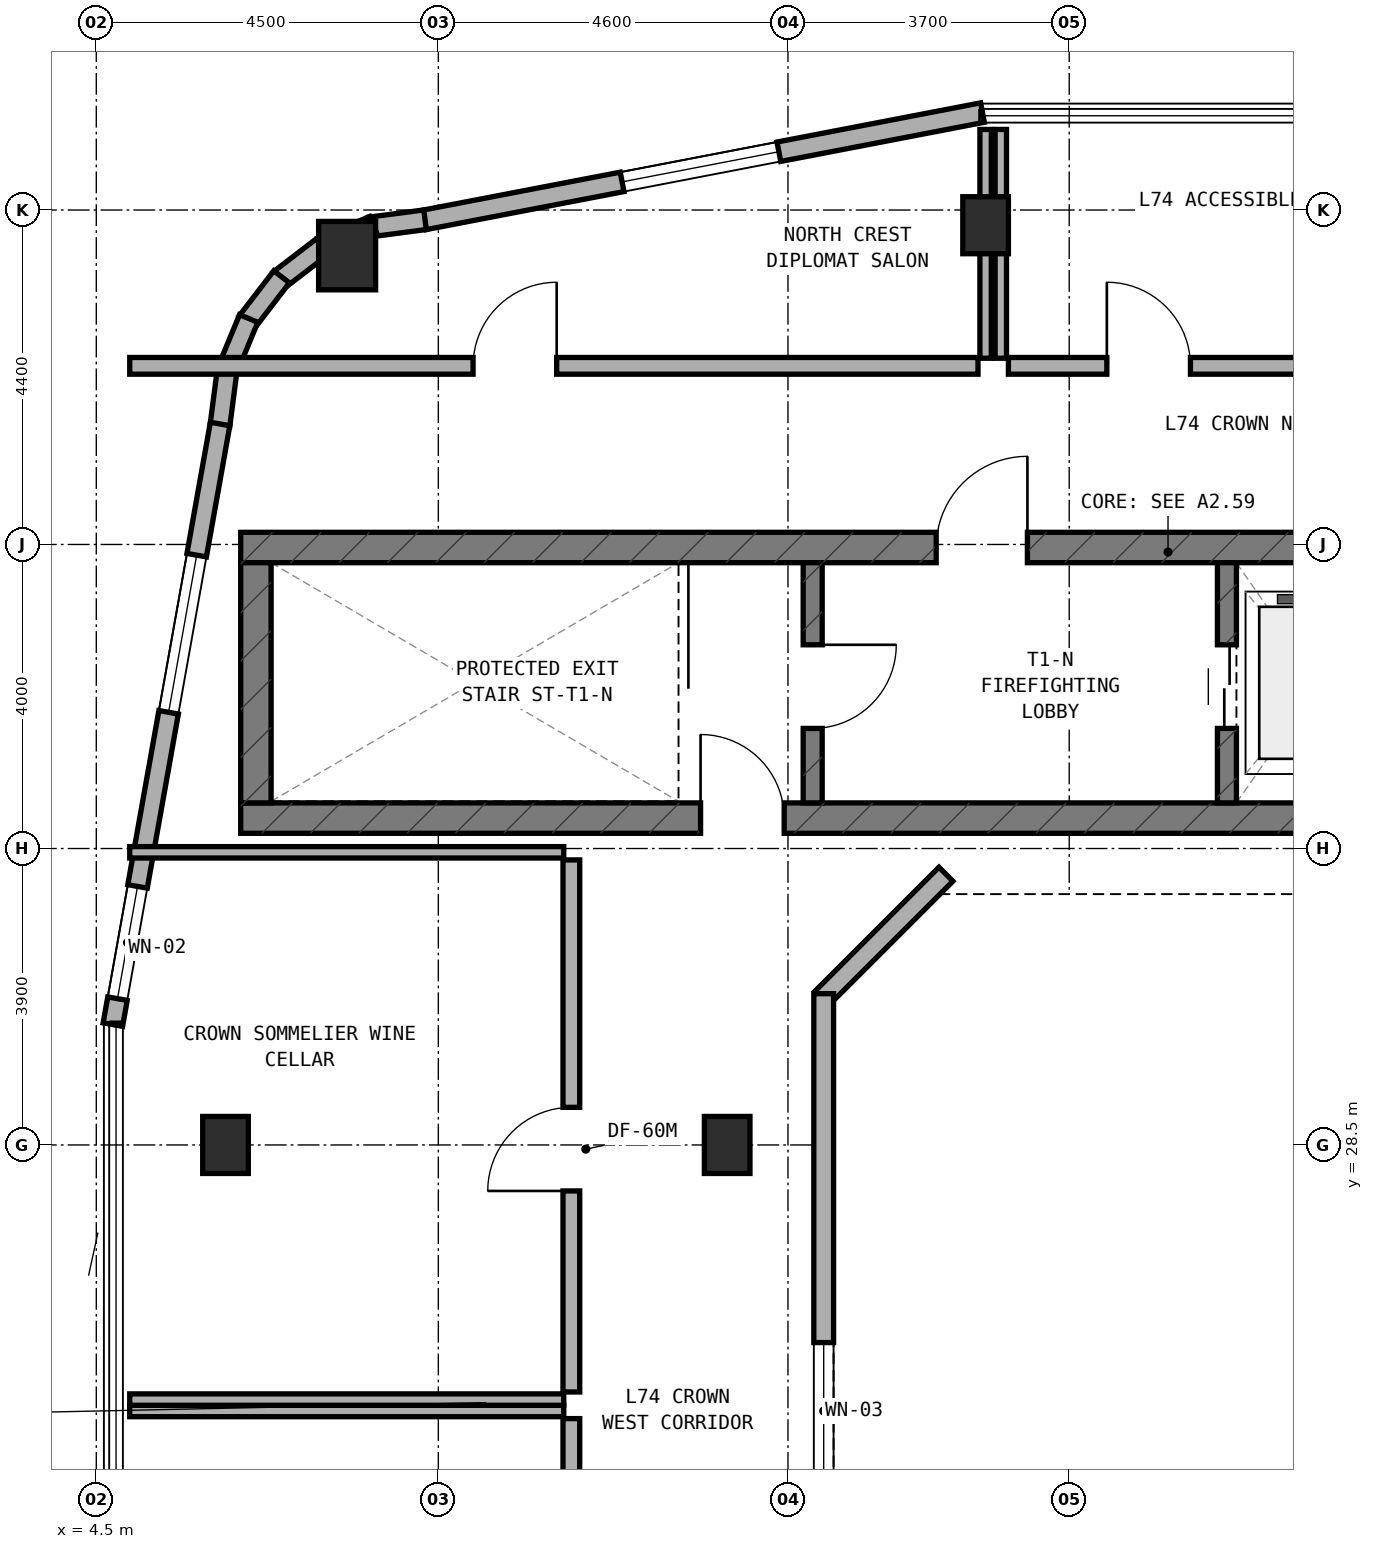
"""IFC4 building model, lengths in metres.
Left out: names, types, materials, properties, quantities, classifications, styles, units other than length and angle.
Written with IfcOpenShell. Run it as: python <this file> out.ifc"""

import sys

from ifc_helpers import new_model, si_unit, direction, frame, frame_2d, origin, origin_2d, place, context, subcontext, project, spatial, rectangle, extrude, element, fill, save


model = new_model("IFC4")
c1 = context("Model", 3, precision=1e-05, world=origin(), true_north=direction((0.0, 1.0)))
c2 = subcontext(c1, "Body", "Model", "MODEL_VIEW")
j1 = project(units=[si_unit("LENGTHUNIT", "METRE"), si_unit("PLANEANGLEUNIT", "RADIAN")], contexts=[c1])
p1 = place(None, origin())
s1 = spatial("IfcSite", under=j1, at=p1, CompositionType="ELEMENT")
p2 = place(p1, origin())
s2 = spatial("IfcBuilding", under=s1, at=p2, CompositionType="ELEMENT")
p3 = place(p2, frame((0.0, 0.0, 272.0)))
s3 = spatial("IfcBuildingStorey", under=s2, at=p3, CompositionType="ELEMENT", Elevation=272.0)
p4 = place(p3, frame((6.4, 32.8, 0.0), z_axis=(0.0, 0.0, 1.0), x_axis=(1.0, 0.0, 0.0)))
e1 = element("IfcWall", 1, at=p4, inside=s3, PredefinedType="SHEAR", context=c2, shape_type="SweptSolid", body=[
    extrude(rectangle(XDim=24.4, YDim=0.4, at=frame_2d((12.2, 0.0))), origin(), (0.0, 0.0, 1.0), 4.56),
])
p5 = place(p4, frame((6.05, 0.0, 0.0)))
e2 = element("IfcOpeningElement", 2, at=p5, cuts=e1, PredefinedType="OPENING", context=c2, shape_type="SweptSolid", body=[
    extrude(rectangle(XDim=1.1, YDim=2.15, at=frame_2d((0.55, 1.075))), frame((0.0, 0.21, 0.0), z_axis=(0.0, -1.0, 0.0), x_axis=(1.0, 0.0, 0.0)), (0.0, 0.0, 1.0), 0.42),
])
p6 = place(p3, frame((6.4, 36.36, 0.0), z_axis=(0.0, 0.0, 1.0), x_axis=(1.0, 0.0, 0.0)))
e3 = element("IfcWall", 3, at=p6, inside=s3, PredefinedType="SHEAR", context=c2, shape_type="SweptSolid", body=[
    extrude(rectangle(XDim=24.4, YDim=0.4, at=frame_2d((12.2, 0.0))), origin(), (0.0, 0.0, 1.0), 4.56),
])
p7 = place(p6, frame((9.15, 0.0, 0.0)))
e4 = element("IfcOpeningElement", 4, at=p7, cuts=e3, PredefinedType="OPENING", context=c2, shape_type="SweptSolid", body=[
    extrude(rectangle(XDim=1.2, YDim=2.15, at=frame_2d((0.6, 1.075))), frame((0.0, 0.21, 0.0), z_axis=(0.0, -1.0, 0.0), x_axis=(1.0, 0.0, 0.0)), (0.0, 0.0, 1.0), 0.42),
])
p8 = place(p6, frame((19.2, 0.0, 0.0)))
e5 = element("IfcOpeningElement", 5, at=p8, cuts=e3, PredefinedType="OPENING", context=c2, shape_type="SweptSolid", body=[
    extrude(rectangle(XDim=0.85, YDim=2.1, at=frame_2d((0.425, 1.05))), frame((0.0, 0.21, 0.0), z_axis=(0.0, -1.0, 0.0), x_axis=(1.0, 0.0, 0.0)), (0.0, 0.0, 1.0), 0.42),
])
p9 = place(p6, frame((16.94, 0.0, 0.0)))
e6 = element("IfcOpeningElement", 6, at=p9, cuts=e3, PredefinedType="OPENING", context=c2, shape_type="SweptSolid", body=[
    extrude(rectangle(XDim=0.85, YDim=2.1, at=frame_2d((0.425, 1.05))), frame((0.0, 0.21, 0.0), z_axis=(0.0, -1.0, 0.0), x_axis=(1.0, 0.0, 0.0)), (0.0, 0.0, 1.0), 0.42),
])
p10 = place(p3, frame((6.6, 33.0, 0.0), z_axis=(0.0, 0.0, 1.0), x_axis=(0.0, 1.0, 0.0)))
e7 = element("IfcWall", 7, at=p10, inside=s3, PredefinedType="SHEAR", context=c2, shape_type="SweptSolid", body=[
    extrude(rectangle(XDim=3.16, YDim=0.4, at=frame_2d((1.58, 0.0))), origin(), (0.0, 0.0, 1.0), 4.56),
])
p11 = place(p3, frame((13.925, 33.0, 0.0), z_axis=(0.0, 0.0, 1.0), x_axis=(0.0, 1.0, 0.0)))
e8 = element("IfcWall", 8, at=p11, inside=s3, PredefinedType="STANDARD", context=c2, shape_type="SweptSolid", body=[
    extrude(rectangle(XDim=3.16, YDim=0.25, at=frame_2d((1.58, 0.0))), origin(), (0.0, 0.0, 1.0), 4.52),
])
p12 = place(p11, frame((0.98, 0.0, 0.0)))
e9 = element("IfcOpeningElement", 9, at=p12, cuts=e8, PredefinedType="OPENING", context=c2, shape_type="SweptSolid", body=[
    extrude(rectangle(XDim=1.1, YDim=2.15, at=frame_2d((0.55, 1.075))), frame((0.0, 0.135, 0.0), z_axis=(0.0, -1.0, 0.0), x_axis=(1.0, 0.0, 0.0)), (0.0, 0.0, 1.0), 0.27),
])
p13 = place(p3, frame((19.375, 33.0, 0.0), z_axis=(0.0, 0.0, 1.0), x_axis=(0.0, 1.0, 0.0)))
e10 = element("IfcWall", 10, at=p13, inside=s3, PredefinedType="STANDARD", context=c2, shape_type="SweptSolid", body=[
    extrude(rectangle(XDim=3.16, YDim=0.25, at=frame_2d((1.58, 0.0))), origin(), (0.0, 0.0, 1.0), 4.52),
])
p14 = place(p13, frame((0.98, 0.0, 0.0)))
e11 = element("IfcOpeningElement", 11, at=p14, cuts=e10, PredefinedType="OPENING", context=c2, shape_type="SweptSolid", body=[
    extrude(rectangle(XDim=1.1, YDim=2.15, at=frame_2d((0.55, 1.075))), frame((0.0, 0.135, 0.0), z_axis=(0.0, -1.0, 0.0), x_axis=(1.0, 0.0, 0.0)), (0.0, 0.0, 1.0), 0.27),
])
p15 = place(p3, frame((16.2, 40.6, 0.0), z_axis=(0.0, 0.0, 1.0), x_axis=(1.0, 0.0, 0.0)))
e12 = element("IfcColumn", 12, at=p15, inside=s3, PredefinedType="COLUMN", context=c2, shape_type="SweptSolid", body=[
    extrude(rectangle(XDim=0.6, YDim=0.75, at=origin_2d()), origin(), (0.0, 0.0, 1.0), 4.8),
])
p16 = place(p3, frame((6.2, 28.5, 0.0), z_axis=(0.0, 0.0, 1.0), x_axis=(1.0, 0.0, 0.0)))
e13 = element("IfcColumn", 13, at=p16, inside=s3, PredefinedType="COLUMN", context=c2, shape_type="SweptSolid", body=[
    extrude(rectangle(XDim=0.6, YDim=0.75, at=origin_2d()), origin(), (0.0, 0.0, 1.0), 3.068),
])
p17 = place(p3, frame((7.8, 40.2, 0.0), z_axis=(0.0, 0.0, 1.0), x_axis=(1.0, 0.0, 0.0)))
e14 = element("IfcColumn", 14, at=p17, inside=s3, PredefinedType="COLUMN", context=c2, shape_type="SweptSolid", body=[
    extrude(rectangle(XDim=0.75, YDim=0.9, at=origin_2d()), origin(), (0.0, 0.0, 1.0), 3.408),
])
p18 = place(p3, frame((12.8, 28.5, 0.0), z_axis=(0.0, 0.0, 1.0), x_axis=(1.0, 0.0, 0.0)))
e15 = element("IfcColumn", 15, at=p18, inside=s3, PredefinedType="COLUMN", context=c2, shape_type="SweptSolid", body=[
    extrude(rectangle(XDim=0.6, YDim=0.75, at=origin_2d()), origin(), (0.0, 0.0, 1.0), 4.471),
])
p19 = place(p3, frame((16.159, 42.082, 0.0), z_axis=(0.0, 0.0, 1.0), x_axis=(-0.982002021426, -0.188870405079, 0.0)))
e16 = element("IfcWall", 16, at=p19, inside=s3, PredefinedType="STANDARD", context=c2, shape_type="SweptSolid", body=[
    extrude(rectangle(XDim=7.477, YDim=0.26, at=frame_2d((3.738, 0.0))), origin(), (0.0, 0.0, 1.0), 2.74),
])
p20 = place(p19, frame((2.728, 0.0, 0.85)))
e17 = element("IfcOpeningElement", 17, at=p20, cuts=e16, PredefinedType="OPENING", context=c2, shape_type="SweptSolid", body=[
    extrude(rectangle(XDim=2.1, YDim=1.5, at=frame_2d((1.05, 0.75))), frame((0.0, 0.14, 0.0), z_axis=(0.0, -1.0, 0.0), x_axis=(1.0, 0.0, 0.0)), (0.0, 0.0, 1.0), 0.28),
])
p21 = place(p3, frame((8.825, 40.672, 0.0), z_axis=(0.0, 0.0, 1.0), x_axis=(-0.991437192142, -0.130584432602, 0.0)))
e18 = element("IfcWall", 18, at=p21, inside=s3, PredefinedType="STANDARD", context=c2, shape_type="SweptSolid", body=[
    extrude(rectangle(XDim=0.729, YDim=0.26, at=frame_2d((0.365, 0.0))), origin(), (0.0, 0.0, 1.0), 2.74),
])
p22 = place(p3, frame((8.148, 40.595, 0.0), z_axis=(0.0, 0.0, 1.0), x_axis=(-0.923637576129, -0.383267045233, 0.0)))
e19 = element("IfcWall", 19, at=p22, inside=s3, PredefinedType="STANDARD", context=c2, shape_type="SweptSolid", body=[
    extrude(rectangle(XDim=0.746, YDim=0.26, at=frame_2d((0.373, 0.0))), origin(), (0.0, 0.0, 1.0), 2.74),
])
p23 = place(p3, frame((7.499, 40.337, 0.0), z_axis=(0.0, 0.0, 1.0), x_axis=(-0.79363269798, -0.608397189915, 0.0)))
e20 = element("IfcWall", 20, at=p23, inside=s3, PredefinedType="STANDARD", context=c2, shape_type="SweptSolid", body=[
    extrude(rectangle(XDim=0.746, YDim=0.26, at=frame_2d((0.373, 0.0))), origin(), (0.0, 0.0, 1.0), 2.74),
])
for number, where, z_axis, x_axis in (
    (21, (6.938, 39.921, 0.0), (0.0, 0.0, 1.0), (-0.609, -0.793, 0.0)),
    (22, (6.505, 39.373, 0.0), (0.0, 0.0, 1.0), (-0.383, -0.924, 0.0)),
):
    element("IfcWall", number, at=place(p3, frame(where, z_axis=z_axis, x_axis=x_axis)), inside=s3, PredefinedType="STANDARD", context=c2, shape_type="SweptSolid", body=[
        extrude(rectangle(XDim=0.746, YDim=0.26, at=frame_2d((0.373, 0.0))), origin(), (0.0, 0.0, 1.0), 2.74),
    ])
p24 = place(p3, frame((6.227, 38.733, 0.0), z_axis=(0.0, 0.0, 1.0), x_axis=(-0.12969424545, -0.991554034179, 0.0)))
e23 = element("IfcWall", 23, at=p24, inside=s3, PredefinedType="STANDARD", context=c2, shape_type="SweptSolid", body=[
    extrude(rectangle(XDim=0.764, YDim=0.26, at=frame_2d((0.382, 0.0))), origin(), (0.0, 0.0, 1.0), 2.74),
])
p25 = place(p3, frame((6.129, 37.985, 0.0), z_axis=(0.0, 0.0, 1.0), x_axis=(-0.175766426993, -0.984431898682, 0.0)))
e24 = element("IfcWall", 24, at=p25, inside=s3, PredefinedType="STANDARD", context=c2, shape_type="SweptSolid", body=[
    extrude(rectangle(XDim=8.027, YDim=0.26, at=frame_2d((4.014, 0.0))), origin(), (0.0, 0.0, 1.0), 2.74),
])
p26 = place(p25, frame((1.753, 0.0, 0.85)))
e25 = element("IfcOpeningElement", 25, at=p26, cuts=e24, PredefinedType="OPENING", context=c2, shape_type="SweptSolid", body=[
    extrude(rectangle(XDim=2.1, YDim=1.5, at=frame_2d((1.05, 0.75))), frame((0.0, 0.14, 0.0), z_axis=(0.0, -1.0, 0.0), x_axis=(1.0, 0.0, 0.0)), (0.0, 0.0, 1.0), 0.28),
])
p27 = place(p25, frame((6.18, 0.0, 0.85)))
e26 = element("IfcOpeningElement", 26, at=p27, cuts=e24, PredefinedType="OPENING", context=c2, shape_type="SweptSolid", body=[
    extrude(rectangle(XDim=1.5, YDim=1.5, at=frame_2d((0.75, 0.75))), frame((0.0, 0.14, 0.0), z_axis=(0.0, -1.0, 0.0), x_axis=(1.0, 0.0, 0.0)), (0.0, 0.0, 1.0), 0.28),
])
p28 = place(p3, frame((15.678, 32.062, 0.0), z_axis=(0.0, 0.0, 1.0), x_axis=(-0.707106781187, -0.707106781187, 0.0)))
e27 = element("IfcWall", 27, at=p28, inside=s3, PredefinedType="STANDARD", context=c2, shape_type="SweptSolid", body=[
    extrude(rectangle(XDim=2.311, YDim=0.26, at=frame_2d((1.155, 0.0))), origin(), (0.0, 0.0, 1.0), 2.74),
])
p29 = place(p3, frame((14.07, 30.49, 0.0), z_axis=(0.0, 0.0, 1.0), x_axis=(0.0, -1.0, 0.0)))
e28 = element("IfcWall", 28, at=p29, inside=s3, PredefinedType="STANDARD", context=c2, shape_type="SweptSolid", body=[
    extrude(rectangle(XDim=10.98, YDim=0.26, at=frame_2d((5.49, 0.0))), origin(), (0.0, 0.0, 1.0), 2.74),
])
p30 = place(p29, frame((4.59, 0.0, 0.85)))
e29 = element("IfcOpeningElement", 29, at=p30, cuts=e28, PredefinedType="OPENING", context=c2, shape_type="SweptSolid", body=[
    extrude(rectangle(XDim=1.8, YDim=1.5, at=frame_2d((0.9, 0.75))), frame((0.0, 0.14, 0.0), z_axis=(0.0, -1.0, 0.0), x_axis=(1.0, 0.0, 0.0)), (0.0, 0.0, 1.0), 0.28),
])
p31 = place(p3, frame((4.94, 25.0, 0.0), z_axis=(0.0, 0.0, 1.0), x_axis=(1.0, 0.0, 0.0)))
e30 = element("IfcWall", 30, at=p31, inside=s3, PredefinedType="PARTITIONING", context=c2, shape_type="SweptSolid", body=[
    extrude(rectangle(XDim=5.71, YDim=0.15, at=frame_2d((2.855, 0.0))), origin(), (0.0, 0.0, 1.0), 2.72),
])
p32 = place(p3, frame((10.75, 17.75, 0.0), z_axis=(0.0, 0.0, 1.0), x_axis=(0.0, 1.0, 0.0)))
e31 = element("IfcWall", 31, at=p32, inside=s3, PredefinedType="SOLIDWALL", context=c2, shape_type="SweptSolid", body=[
    extrude(rectangle(XDim=7.15, YDim=0.22, at=frame_2d((3.575, 0.0))), origin(), (0.0, 0.0, 1.0), 2.72),
])
p33 = place(p32, frame((2.713, 0.0, 0.0)))
e32 = element("IfcOpeningElement", 32, at=p33, cuts=e31, PredefinedType="OPENING", context=c2, shape_type="SweptSolid", body=[
    extrude(rectangle(XDim=1.1, YDim=2.1, at=frame_2d((0.55, 1.05))), frame((0.0, 0.12, 0.0), z_axis=(0.0, -1.0, 0.0), x_axis=(1.0, 0.0, 0.0)), (0.0, 0.0, 1.0), 0.24),
])
for number, where, z_axis, x_axis in (
    (33, (4.94, 25.15, 0.0), (0.0, 0.0, 1.0), (1.0, 0.0, 0.0)),
    (34, (4.94, 32.35, 0.0), (0.0, 0.0, 1.0), (1.0, 0.0, 0.0)),
):
    element("IfcWall", number, at=place(p3, frame(where, z_axis=z_axis, x_axis=x_axis)), inside=s3, PredefinedType="PARTITIONING", context=c2, shape_type="SweptSolid", body=[
        extrude(rectangle(XDim=5.71, YDim=0.15, at=frame_2d((2.855, 0.0))), origin(), (0.0, 0.0, 1.0), 2.72),
    ])
p34 = place(p3, frame((10.75, 25.25, 0.0), z_axis=(0.0, 0.0, 1.0), x_axis=(0.0, 1.0, 0.0)))
e35 = element("IfcWall", 35, at=p34, inside=s3, PredefinedType="SOLIDWALL", context=c2, shape_type="SweptSolid", body=[
    extrude(rectangle(XDim=7.0, YDim=0.22, at=frame_2d((3.5, 0.0))), origin(), (0.0, 0.0, 1.0), 2.72),
])
p35 = place(p34, frame((2.645, 0.0, 0.0)))
e36 = element("IfcOpeningElement", 36, at=p35, cuts=e35, PredefinedType="OPENING", context=c2, shape_type="SweptSolid", body=[
    extrude(rectangle(XDim=1.1, YDim=2.1, at=frame_2d((0.55, 1.05))), frame((0.0, 0.12, 0.0), z_axis=(0.0, -1.0, 0.0), x_axis=(1.0, 0.0, 0.0)), (0.0, 0.0, 1.0), 0.24),
])
p36 = place(p3, frame((16.2, 38.85, 0.0), z_axis=(0.0, 0.0, 1.0), x_axis=(0.0, 1.0, 0.0)))
e37 = element("IfcWall", 37, at=p36, inside=s3, PredefinedType="PARTITIONING", context=c2, shape_type="SweptSolid", body=[
    extrude(rectangle(XDim=3.01, YDim=0.15, at=frame_2d((1.505, 0.0))), origin(), (0.0, 0.0, 1.0), 2.72),
])
p37 = place(p3, frame((4.94, 38.75, 0.0), z_axis=(0.0, 0.0, 1.0), x_axis=(1.0, 0.0, 0.0)))
e38 = element("IfcWall", 38, at=p37, inside=s3, PredefinedType="SOLIDWALL", context=c2, shape_type="SweptSolid", body=[
    extrude(rectangle(XDim=11.16, YDim=0.22, at=frame_2d((5.58, 0.0))), origin(), (0.0, 0.0, 1.0), 2.72),
])
p38 = place(p37, frame((4.517, 0.0, 0.0)))
e39 = element("IfcOpeningElement", 39, at=p38, cuts=e38, PredefinedType="OPENING", context=c2, shape_type="SweptSolid", body=[
    extrude(rectangle(XDim=1.1, YDim=2.1, at=frame_2d((0.55, 1.05))), frame((0.0, 0.12, 0.0), z_axis=(0.0, -1.0, 0.0), x_axis=(1.0, 0.0, 0.0)), (0.0, 0.0, 1.0), 0.24),
])
p39 = place(p3, frame((16.4, 38.85, 0.0), z_axis=(0.0, 0.0, 1.0), x_axis=(0.0, 1.0, 0.0)))
e40 = element("IfcWall", 40, at=p39, inside=s3, PredefinedType="PARTITIONING", context=c2, shape_type="SweptSolid", body=[
    extrude(rectangle(XDim=3.01, YDim=0.15, at=frame_2d((1.505, 0.0))), origin(), (0.0, 0.0, 1.0), 2.72),
])
p40 = place(p3, frame((16.5, 38.75, 0.0), z_axis=(0.0, 0.0, 1.0), x_axis=(1.0, 0.0, 0.0)))
e41 = element("IfcWall", 41, at=p40, inside=s3, PredefinedType="SOLIDWALL", context=c2, shape_type="SweptSolid", body=[
    extrude(rectangle(XDim=4.0, YDim=0.22, at=frame_2d((2.0, 0.0))), origin(), (0.0, 0.0, 1.0), 2.72),
])
p41 = place(p40, frame((1.295, 0.0, 0.0)))
e42 = element("IfcOpeningElement", 42, at=p41, cuts=e41, PredefinedType="OPENING", context=c2, shape_type="SweptSolid", body=[
    extrude(rectangle(XDim=1.1, YDim=2.1, at=frame_2d((0.55, 1.05))), frame((0.0, 0.12, 0.0), z_axis=(0.0, -1.0, 0.0), x_axis=(1.0, 0.0, 0.0)), (0.0, 0.0, 1.0), 0.24),
])
p42 = place(p20, origin())
e43 = element("IfcWindow", 43, at=p42, inside=s3, PartitioningType="SINGLE_PANEL", PredefinedType="WINDOW", context=c2, shape_type="SweptSolid", body=[
    extrude(rectangle(XDim=2.1, YDim=1.5, at=frame_2d((1.05, 0.75))), frame((0.0, 0.03, 0.0), z_axis=(0.0, -1.0, 0.0), x_axis=(1.0, 0.0, 0.0)), (0.0, 0.0, 1.0), 0.06),
])
fill(e17, e43)
p43 = place(p26, origin())
e44 = element("IfcWindow", 44, at=p43, inside=s3, PartitioningType="SINGLE_PANEL", PredefinedType="WINDOW", context=c2, shape_type="SweptSolid", body=[
    extrude(rectangle(XDim=2.1, YDim=1.5, at=frame_2d((1.05, 0.75))), frame((0.0, 0.03, 0.0), z_axis=(0.0, -1.0, 0.0), x_axis=(1.0, 0.0, 0.0)), (0.0, 0.0, 1.0), 0.06),
])
fill(e25, e44)
p44 = place(p27, origin())
e45 = element("IfcWindow", 45, at=p44, inside=s3, PartitioningType="SINGLE_PANEL", PredefinedType="WINDOW", context=c2, shape_type="SweptSolid", body=[
    extrude(rectangle(XDim=1.5, YDim=1.5, at=frame_2d((0.75, 0.75))), frame((0.0, 0.03, 0.0), z_axis=(0.0, -1.0, 0.0), x_axis=(1.0, 0.0, 0.0)), (0.0, 0.0, 1.0), 0.06),
])
fill(e26, e45)
p45 = place(p30, origin())
e46 = element("IfcWindow", 46, at=p45, inside=s3, PartitioningType="SINGLE_PANEL", PredefinedType="WINDOW", context=c2, shape_type="SweptSolid", body=[
    extrude(rectangle(XDim=1.8, YDim=1.5, at=frame_2d((0.9, 0.75))), frame((0.0, 0.03, 0.0), z_axis=(0.0, -1.0, 0.0), x_axis=(1.0, 0.0, 0.0)), (0.0, 0.0, 1.0), 0.06),
])
fill(e29, e46)
p46 = place(p12, frame((1.1, 0.0, 0.0), z_axis=(0.0, 0.0, 1.0), x_axis=(-1.0, 0.0, 0.0)))
e47 = element("IfcDoor", 47, at=p46, inside=s3, OperationType="SINGLE_SWING_LEFT", PredefinedType="DOOR", context=c2, shape_type="SweptSolid", body=[
    extrude(rectangle(XDim=1.1, YDim=2.15, at=frame_2d((0.55, 1.075))), frame((0.0, 0.025, 0.0), z_axis=(0.0, -1.0, 0.0), x_axis=(1.0, 0.0, 0.0)), (0.0, 0.0, 1.0), 0.05),
])
fill(e9, e47)
p47 = place(p7, origin())
e48 = element("IfcDoor", 48, at=p47, inside=s3, OperationType="SINGLE_SWING_RIGHT", PredefinedType="DOOR", context=c2, shape_type="SweptSolid", body=[
    extrude(rectangle(XDim=1.2, YDim=2.15, at=frame_2d((0.6, 1.075))), frame((0.0, 0.025, 0.0), z_axis=(0.0, -1.0, 0.0), x_axis=(1.0, 0.0, 0.0)), (0.0, 0.0, 1.0), 0.05),
])
fill(e4, e48)
p48 = place(p14, origin())
e49 = element("IfcDoor", 49, at=p48, inside=s3, OperationType="DOUBLE_DOOR_SLIDING", PredefinedType="DOOR", context=c2, shape_type="SweptSolid", body=[
    extrude(rectangle(XDim=1.1, YDim=2.15, at=frame_2d((0.55, 1.075))), frame((0.0, 0.025, 0.0), z_axis=(0.0, -1.0, 0.0), x_axis=(1.0, 0.0, 0.0)), (0.0, 0.0, 1.0), 0.05),
])
fill(e11, e49)
p49 = place(p5, origin())
e50 = element("IfcDoor", 50, at=p49, inside=s3, OperationType="SINGLE_SWING_LEFT", PredefinedType="DOOR", context=c2, shape_type="SweptSolid", body=[
    extrude(rectangle(XDim=1.1, YDim=2.15, at=frame_2d((0.55, 1.075))), frame((0.0, 0.025, 0.0), z_axis=(0.0, -1.0, 0.0), x_axis=(1.0, 0.0, 0.0)), (0.0, 0.0, 1.0), 0.05),
])
fill(e2, e50)
p50 = place(p35, origin())
e51 = element("IfcDoor", 51, at=p50, inside=s3, OperationType="SINGLE_SWING_LEFT", PredefinedType="DOOR", context=c2, shape_type="SweptSolid", body=[
    extrude(rectangle(XDim=1.1, YDim=2.1, at=frame_2d((0.55, 1.05))), frame((0.0, 0.025, 0.0), z_axis=(0.0, -1.0, 0.0), x_axis=(1.0, 0.0, 0.0)), (0.0, 0.0, 1.0), 0.05),
])
fill(e36, e51)
p51 = place(p38, origin())
e52 = element("IfcDoor", 52, at=p51, inside=s3, OperationType="SINGLE_SWING_RIGHT", PredefinedType="DOOR", context=c2, shape_type="SweptSolid", body=[
    extrude(rectangle(XDim=1.1, YDim=2.1, at=frame_2d((0.55, 1.05))), frame((0.0, 0.025, 0.0), z_axis=(0.0, -1.0, 0.0), x_axis=(1.0, 0.0, 0.0)), (0.0, 0.0, 1.0), 0.05),
])
fill(e39, e52)
p52 = place(p41, origin())
e53 = element("IfcDoor", 53, at=p52, inside=s3, OperationType="SINGLE_SWING_LEFT", PredefinedType="DOOR", context=c2, shape_type="SweptSolid", body=[
    extrude(rectangle(XDim=1.1, YDim=2.1, at=frame_2d((0.55, 1.05))), frame((0.0, 0.025, 0.0), z_axis=(0.0, -1.0, 0.0), x_axis=(1.0, 0.0, 0.0)), (0.0, 0.0, 1.0), 0.05),
])
fill(e42, e53)
save(model, sys.argv[1])
